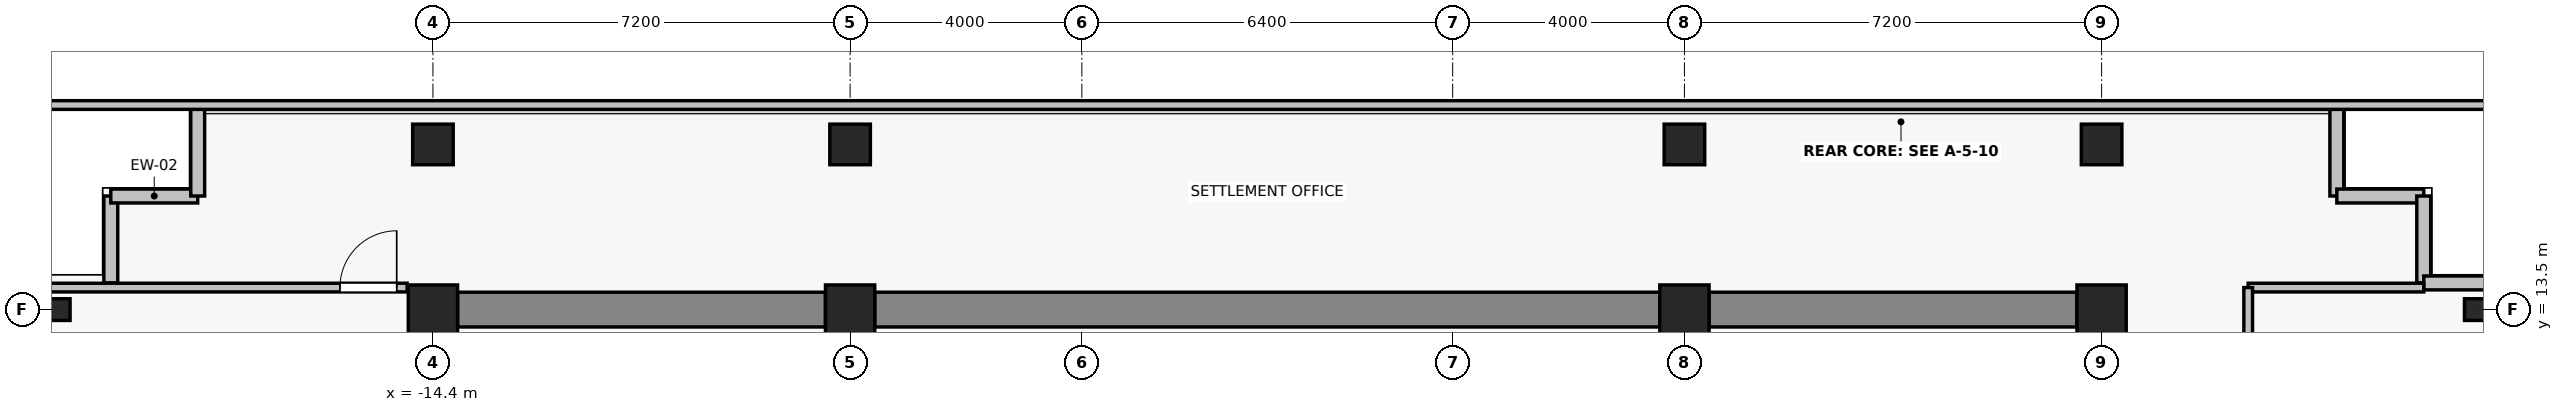
"""IFC4 building model, lengths in metres.
Left out: names, types, materials, properties, quantities, classifications, styles, units other than length and angle.
Written with IfcOpenShell. Run it as: python <this file> out.ifc"""

import sys

from ifc_helpers import new_model, si_unit, direction, frame, frame_2d, origin, origin_2d, place, context, subcontext, project, spatial, rectangle, i_section, extrude, source, transform, mapped, element, fill, save


model = new_model("IFC4")
c1 = context("Model", 3, precision=1e-05, world=origin(), true_north=direction((0.0, 1.0)))
c2 = subcontext(c1, "Body", "Model", "MODEL_VIEW")
j1 = project(units=[si_unit("LENGTHUNIT", "METRE"), si_unit("PLANEANGLEUNIT", "RADIAN")], contexts=[c1])
p1 = place(None, origin())
s1 = spatial("IfcSite", under=j1, at=p1, CompositionType="ELEMENT")
p2 = place(p1, origin())
s2 = spatial("IfcBuilding", under=s1, at=p2, CompositionType="ELEMENT")
p3 = place(p2, frame((0.0, 0.0, 261.7)))
s3 = spatial("IfcBuildingStorey", under=s2, at=p3, CompositionType="ELEMENT", Elevation=261.7)
for number, where, z_axis, x_axis in (
    (1, (-14.4, 13.5, 0.0), (0.0, 0.0, 1.0), (1.0, 0.0, 0.0)),
    (2, (-7.2, 13.5, 0.0), (0.0, 0.0, 1.0), (1.0, 0.0, 0.0)),
    (3, (7.2, 13.5, 0.0), (0.0, 0.0, 1.0), (1.0, 0.0, 0.0)),
    (4, (14.4, 13.5, 0.0), (0.0, 0.0, 1.0), (1.0, 0.0, 0.0)),
):
    element("IfcColumn", number, at=place(p3, frame(where, z_axis=z_axis, x_axis=x_axis)), inside=s3, PredefinedType="COLUMN", context=c2, shape_type="SweptSolid", body=[
        extrude(rectangle(XDim=0.85, YDim=0.85, at=origin_2d()), origin(), (0.0, 0.0, 1.0), 3.3),
    ])
for number, where, z_axis, x_axis in (
    (5, (-14.4, 16.35, 0.0), (0.0, 0.0, 1.0), (1.0, 0.0, 0.0)),
    (6, (-7.2, 16.35, 0.0), (0.0, 0.0, 1.0), (1.0, 0.0, 0.0)),
    (7, (7.2, 16.35, 0.0), (0.0, 0.0, 1.0), (1.0, 0.0, 0.0)),
    (8, (14.4, 16.35, 0.0), (0.0, 0.0, 1.0), (1.0, 0.0, 0.0)),
):
    element("IfcColumn", number, at=place(p3, frame(where, z_axis=z_axis, x_axis=x_axis)), inside=s3, PredefinedType="COLUMN", context=c2, shape_type="SweptSolid", body=[
        extrude(rectangle(XDim=0.7, YDim=0.7, at=origin_2d()), origin(), (0.0, 0.0, 1.0), 3.3),
    ])
for number, where, z_axis, x_axis in (
    (9, (-20.85, 13.5, 0.0), (0.0, 0.0, 1.0), (1.0, 0.0, 0.0)),
    (10, (20.85, 13.5, 0.0), (0.0, 0.0, 1.0), (1.0, 0.0, 0.0)),
):
    element("IfcColumn", number, at=place(p3, frame(where, z_axis=z_axis, x_axis=x_axis)), inside=s3, PredefinedType="COLUMN", context=c2, shape_type="SweptSolid", body=[
        extrude(i_section(OverallWidth=0.375, OverallDepth=0.375, WebThickness=0.017, FlangeThickness=0.027, FilletRadius=0.015, at=origin_2d()), origin(), (0.0, 0.0, 1.0), 3.3),
    ])
p4 = place(p3, frame((-13.975, 13.5, 0.0), z_axis=(0.0, 0.0, 1.0), x_axis=(1.0, 0.0, 0.0)))
e11 = element("IfcWall", 11, at=p4, inside=s3, PredefinedType="SHEAR", context=c2, shape_type="SweptSolid", body=[
    extrude(rectangle(XDim=6.35, YDim=0.6, at=frame_2d((3.175, 0.0))), origin(), (0.0, 0.0, 1.0), 3.075),
])
p5 = place(p3, frame((-6.775, 13.5, 0.0), z_axis=(0.0, 0.0, 1.0), x_axis=(1.0, 0.0, 0.0)))
e12 = element("IfcWall", 12, at=p5, inside=s3, PredefinedType="SHEAR", context=c2, shape_type="SweptSolid", body=[
    extrude(rectangle(XDim=13.55, YDim=0.6, at=frame_2d((6.775, 0.0))), origin(), (0.0, 0.0, 1.0), 3.075),
])
p6 = place(p3, frame((7.625, 13.5, 0.0), z_axis=(0.0, 0.0, 1.0), x_axis=(1.0, 0.0, 0.0)))
e13 = element("IfcWall", 13, at=p6, inside=s3, PredefinedType="SHEAR", context=c2, shape_type="SweptSolid", body=[
    extrude(rectangle(XDim=6.35, YDim=0.6, at=frame_2d((3.175, 0.0))), origin(), (0.0, 0.0, 1.0), 3.075),
])
for number, where, z_axis, x_axis in (
    (14, (-19.96, 15.46, 0.0), (0.0, 0.0, 1.0), (0.0, -1.0, 0.0)),
    (15, (-18.46, 15.46, 0.0), (0.0, 0.0, 1.0), (-1.0, 0.0, 0.0)),
    (16, (-18.46, 16.96, 0.0), (0.0, 0.0, 1.0), (0.0, -1.0, 0.0)),
    (17, (18.46, 15.46, 0.0), (0.0, 0.0, 1.0), (0.0, 1.0, 0.0)),
    (18, (19.96, 15.46, 0.0), (0.0, 0.0, 1.0), (-1.0, 0.0, 0.0)),
    (19, (19.96, 13.96, 0.0), (0.0, 0.0, 1.0), (0.0, 1.0, 0.0)),
    (20, (21.46, 13.96, 0.0), (0.0, 0.0, 1.0), (-1.0, 0.0, 0.0)),
):
    element("IfcWall", number, at=place(p3, frame(where, z_axis=z_axis, x_axis=x_axis)), inside=s3, PredefinedType="SOLIDWALL", context=c2, shape_type="SweptSolid", body=[
        extrude(rectangle(XDim=1.5, YDim=0.24, at=frame_2d((0.75, 0.0))), origin(), (0.0, 0.0, 1.0), 3.075),
    ])
p7 = place(p3, frame((-21.53, 13.88, 0.0), z_axis=(0.0, 0.0, 1.0), x_axis=(1.0, 0.0, 0.0)))
e21 = element("IfcWall", 21, at=p7, inside=s3, PredefinedType="PARTITIONING", context=c2, shape_type="SweptSolid", body=[
    extrude(rectangle(XDim=6.685, YDim=0.15, at=frame_2d((3.343, 0.0))), origin(), (0.0, 0.0, 1.0), 3.075),
])
p8 = place(p7, frame((5.525, 0.0, 0.0)))
e22 = element("IfcOpeningElement", 22, at=p8, cuts=e21, PredefinedType="OPENING", context=c2, shape_type="SweptSolid", body=[
    extrude(rectangle(XDim=0.98, YDim=2.15, at=frame_2d((0.49, 1.075))), frame((0.0, 0.085, 0.0), z_axis=(0.0, -1.0, 0.0), x_axis=(1.0, 0.0, 0.0)), (0.0, 0.0, 1.0), 0.17),
])
p9 = place(p3, frame((16.93, 13.88, 0.0), z_axis=(0.0, 0.0, 1.0), x_axis=(1.0, 0.0, 0.0)))
e23 = element("IfcWall", 23, at=p9, inside=s3, PredefinedType="PARTITIONING", context=c2, shape_type="SweptSolid", body=[
    extrude(rectangle(XDim=3.03, YDim=0.15, at=frame_2d((1.515, 0.0))), origin(), (0.0, 0.0, 1.0), 3.075),
])
p10 = place(p3, frame((16.93, 9.258, 0.0), z_axis=(0.0, 0.0, 1.0), x_axis=(0.0, 1.0, 0.0)))
e24 = element("IfcWall", 24, at=p10, inside=s3, PredefinedType="PARTITIONING", context=c2, shape_type="SweptSolid", body=[
    extrude(rectangle(XDim=4.622, YDim=0.15, at=frame_2d((2.311, 0.0))), origin(), (0.0, 0.0, 1.0), 2.615),
])
p11 = place(p10, frame((1.821, 0.0, 0.0)))
e25 = element("IfcOpeningElement", 25, at=p11, cuts=e24, PredefinedType="OPENING", context=c2, shape_type="SweptSolid", body=[
    extrude(rectangle(XDim=0.98, YDim=2.15, at=frame_2d((0.49, 1.075))), frame((0.0, 0.085, 0.0), z_axis=(0.0, -1.0, 0.0), x_axis=(1.0, 0.0, 0.0)), (0.0, 0.0, 1.0), 0.17),
])
p12 = place(p3, frame((-21.53, 17.03, 0.0), z_axis=(0.0, 0.0, 1.0), x_axis=(1.0, 0.0, 0.0)))
e26 = element("IfcWall", 26, at=p12, inside=s3, PredefinedType="PARTITIONING", context=c2, shape_type="SweptSolid", body=[
    extrude(rectangle(XDim=43.06, YDim=0.15, at=frame_2d((21.53, 0.0))), origin(), (0.0, 0.0, 1.0), 3.075),
])
m1 = source(origin(), c2, "Body", "SweptSolid", [
    extrude(rectangle(XDim=0.98, YDim=2.15, at=frame_2d((0.49, 1.075))), frame((0.0, 0.025, 0.0), z_axis=(0.0, -1.0, 0.0), x_axis=(1.0, 0.0, 0.0)), (0.0, 0.0, 1.0), 0.05),
])
p13 = place(p8, origin())
e27 = element("IfcDoor", 27, at=p13, inside=s3, OperationType="SINGLE_SWING_RIGHT", PredefinedType="DOOR", context=c2, shape_type="MappedRepresentation", body=[
    mapped(m1, transform((0.0, 0.0, 0.0), x_axis=(1.0, 0.0, 0.0), y_axis=(0.0, 1.0, 0.0), z_axis=(0.0, 0.0, 1.0), scale=1.0)),
])
fill(e22, e27)
save(model, sys.argv[1])
